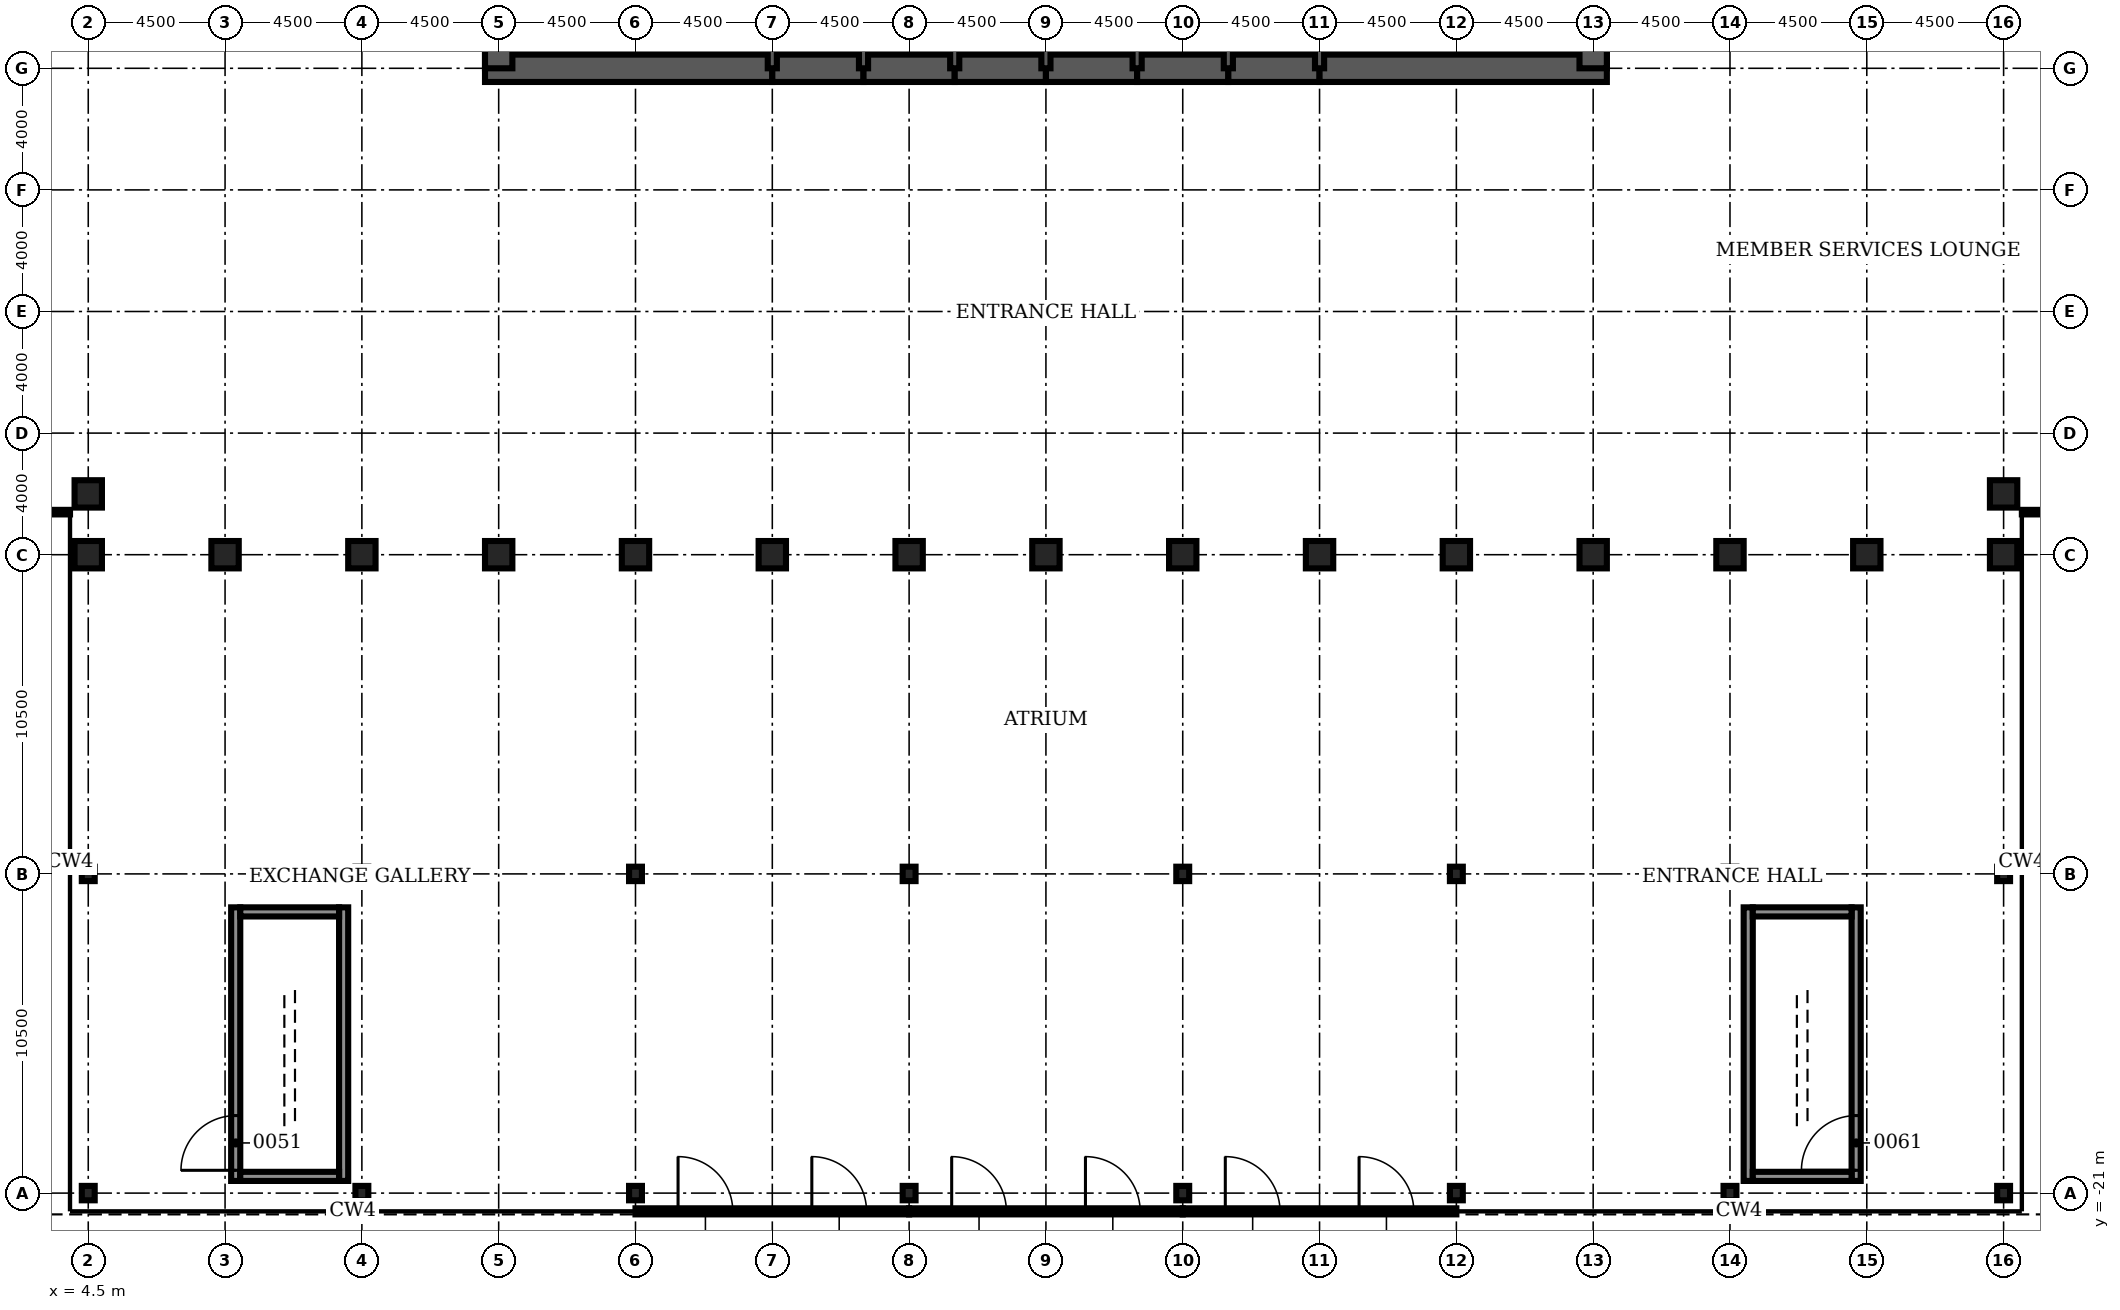
"""IFC4 building model, lengths in metres.
Left out: names, types, materials, properties, quantities, classifications, styles, units other than length and angle.
Written with IfcOpenShell. Run it as: python <this file> out.ifc"""

import sys

from ifc_helpers import new_model, si_unit, direction, frame, frame_2d, origin, origin_2d, place, context, subcontext, project, spatial, rectangle, hollow_rectangle, i_section, extrude, element, fill, save


model = new_model("IFC4")
c1 = context("Model", 3, precision=1e-05, world=origin(), true_north=direction((0.0, 1.0)))
c2 = subcontext(c1, "Body", "Model", "MODEL_VIEW")
j1 = project(units=[si_unit("LENGTHUNIT", "METRE"), si_unit("PLANEANGLEUNIT", "RADIAN")], contexts=[c1])
p1 = place(None, origin())
s1 = spatial("IfcSite", under=j1, at=p1, CompositionType="ELEMENT")
p2 = place(p1, origin())
s2 = spatial("IfcBuilding", under=s1, at=p2, CompositionType="ELEMENT")
p3 = place(p2, origin())
s3 = spatial("IfcBuildingStorey", under=s2, at=p3, CompositionType="ELEMENT", Elevation=0.0)
for number, where, z_axis, x_axis in (
    (1, (4.5, 0.0, 0.0), (0.0, 0.0, 1.0), (0.0, 1.0, 0.0)),
    (2, (9.0, 0.0, 0.0), (0.0, 0.0, 1.0), (0.0, 1.0, 0.0)),
    (3, (13.5, 0.0, 0.0), (0.0, 0.0, 1.0), (0.0, 1.0, 0.0)),
    (4, (18.0, 0.0, 0.0), (0.0, 0.0, 1.0), (0.0, 1.0, 0.0)),
    (5, (22.5, 0.0, 0.0), (0.0, 0.0, 1.0), (0.0, 1.0, 0.0)),
    (6, (27.0, 0.0, 0.0), (0.0, 0.0, 1.0), (0.0, 1.0, 0.0)),
    (7, (31.5, 0.0, 0.0), (0.0, 0.0, 1.0), (0.0, 1.0, 0.0)),
    (8, (36.0, 0.0, 0.0), (0.0, 0.0, 1.0), (0.0, 1.0, 0.0)),
    (9, (40.5, 0.0, 0.0), (0.0, 0.0, 1.0), (0.0, 1.0, 0.0)),
    (10, (45.0, 0.0, 0.0), (0.0, 0.0, 1.0), (0.0, 1.0, 0.0)),
    (11, (49.5, 0.0, 0.0), (0.0, 0.0, 1.0), (0.0, 1.0, 0.0)),
    (12, (54.0, 0.0, 0.0), (0.0, 0.0, 1.0), (0.0, 1.0, 0.0)),
    (13, (58.5, 0.0, 0.0), (0.0, 0.0, 1.0), (0.0, 1.0, 0.0)),
    (14, (63.0, 0.0, 0.0), (0.0, 0.0, 1.0), (0.0, 1.0, 0.0)),
    (15, (67.5, 0.0, 0.0), (0.0, 0.0, 1.0), (0.0, 1.0, 0.0)),
    (16, (67.5, 2.0, 0.0), (0.0, 0.0, 1.0), (0.0, 1.0, 0.0)),
    (17, (4.5, 2.0, 0.0), (0.0, 0.0, 1.0), (0.0, 1.0, 0.0)),
):
    element("IfcColumn", number, at=place(p3, frame(where, z_axis=z_axis, x_axis=x_axis)), inside=s3, PredefinedType="COLUMN", context=c2, shape_type="SweptSolid", body=[
        extrude(hollow_rectangle(XDim=0.9, YDim=0.9, WallThickness=0.12, at=origin_2d()), origin(), (0.0, 0.0, 1.0), 6.0),
    ])
for number, where, z_axis, x_axis in (
    (18, (4.5, -21.0, 0.0), (0.0, 0.0, 1.0), (1.0, 0.0, 0.0)),
    (19, (4.5, -10.5, 0.0), (0.0, 0.0, 1.0), (1.0, 0.0, 0.0)),
    (20, (13.5, -21.0, 0.0), (0.0, 0.0, 1.0), (1.0, 0.0, 0.0)),
    (21, (13.5, -10.5, 0.0), (0.0, 0.0, 1.0), (1.0, 0.0, 0.0)),
    (22, (22.5, -21.0, 0.0), (0.0, 0.0, 1.0), (1.0, 0.0, 0.0)),
    (23, (22.5, -10.5, 0.0), (0.0, 0.0, 1.0), (1.0, 0.0, 0.0)),
    (24, (31.5, -21.0, 0.0), (0.0, 0.0, 1.0), (1.0, 0.0, 0.0)),
    (25, (31.5, -10.5, 0.0), (0.0, 0.0, 1.0), (1.0, 0.0, 0.0)),
    (26, (40.5, -21.0, 0.0), (0.0, 0.0, 1.0), (1.0, 0.0, 0.0)),
    (27, (40.5, -10.5, 0.0), (0.0, 0.0, 1.0), (1.0, 0.0, 0.0)),
    (28, (49.5, -21.0, 0.0), (0.0, 0.0, 1.0), (1.0, 0.0, 0.0)),
    (29, (49.5, -10.5, 0.0), (0.0, 0.0, 1.0), (1.0, 0.0, 0.0)),
    (30, (58.5, -21.0, 0.0), (0.0, 0.0, 1.0), (1.0, 0.0, 0.0)),
    (31, (58.5, -10.5, 0.0), (0.0, 0.0, 1.0), (1.0, 0.0, 0.0)),
    (32, (67.5, -21.0, 0.0), (0.0, 0.0, 1.0), (1.0, 0.0, 0.0)),
    (33, (67.5, -10.5, 0.0), (0.0, 0.0, 1.0), (1.0, 0.0, 0.0)),
):
    element("IfcColumn", number, at=place(p3, frame(where, z_axis=z_axis, x_axis=x_axis)), inside=s3, PredefinedType="COLUMN", context=c2, shape_type="SweptSolid", body=[
        extrude(i_section(OverallWidth=0.424, OverallDepth=0.474, WebThickness=0.048, FlangeThickness=0.077, at=origin_2d()), origin(), (0.0, 0.0, 1.0), 6.0),
    ])
p4 = place(p3, frame((17.55, 16.0, 0.0), z_axis=(0.0, 0.0, 1.0), x_axis=(1.0, 0.0, 0.0)))
e34 = element("IfcWall", 34, at=p4, inside=s3, PredefinedType="SHEAR", context=c2, shape_type="SweptSolid", body=[
    extrude(rectangle(XDim=9.45, YDim=0.9, at=frame_2d((4.725, 0.0))), origin(), (0.0, 0.0, 1.0), 6.0),
])
for number, where, z_axis, x_axis in (
    (35, (27.0, 16.0, 0.0), (0.0, 0.0, 1.0), (1.0, 0.0, 0.0)),
    (36, (30.0, 16.0, 0.0), (0.0, 0.0, 1.0), (1.0, 0.0, 0.0)),
    (37, (33.0, 16.0, 0.0), (0.0, 0.0, 1.0), (1.0, 0.0, 0.0)),
    (38, (36.0, 16.0, 0.0), (0.0, 0.0, 1.0), (1.0, 0.0, 0.0)),
    (39, (39.0, 16.0, 0.0), (0.0, 0.0, 1.0), (1.0, 0.0, 0.0)),
    (40, (42.0, 16.0, 0.0), (0.0, 0.0, 1.0), (1.0, 0.0, 0.0)),
):
    element("IfcWall", number, at=place(p3, frame(where, z_axis=z_axis, x_axis=x_axis)), inside=s3, PredefinedType="SHEAR", context=c2, shape_type="SweptSolid", body=[
        extrude(rectangle(XDim=3.0, YDim=0.9, at=frame_2d((1.5, 0.0))), origin(), (0.0, 0.0, 1.0), 6.0),
    ])
p5 = place(p3, frame((45.0, 16.0, 0.0), z_axis=(0.0, 0.0, 1.0), x_axis=(1.0, 0.0, 0.0)))
e41 = element("IfcWall", 41, at=p5, inside=s3, PredefinedType="SHEAR", context=c2, shape_type="SweptSolid", body=[
    extrude(rectangle(XDim=9.45, YDim=0.9, at=frame_2d((4.725, 0.0))), origin(), (0.0, 0.0, 1.0), 6.0),
])
for number, where, z_axis, x_axis in (
    (42, (18.0, 19.2, 0.0), (0.0, 0.0, 1.0), (0.0, -1.0, 0.0)),
    (43, (54.0, 16.0, 0.0), (0.0, 0.0, 1.0), (0.0, 1.0, 0.0)),
):
    element("IfcWall", number, at=place(p3, frame(where, z_axis=z_axis, x_axis=x_axis)), inside=s3, PredefinedType="SHEAR", context=c2, shape_type="SweptSolid", body=[
        extrude(rectangle(XDim=3.2, YDim=0.9, at=frame_2d((1.6, 0.0))), origin(), (0.0, 0.0, 1.0), 6.0),
    ])
for number, where, z_axis, x_axis in (
    (44, (27.0, 16.0, 0.0), (0.0, 0.0, 1.0), (0.0, 1.0, 0.0)),
    (45, (30.0, 16.0, 0.0), (0.0, 0.0, 1.0), (0.0, 1.0, 0.0)),
    (46, (33.0, 16.0, 0.0), (0.0, 0.0, 1.0), (0.0, 1.0, 0.0)),
    (47, (36.0, 16.0, 0.0), (0.0, 0.0, 1.0), (0.0, 1.0, 0.0)),
    (48, (39.0, 16.0, 0.0), (0.0, 0.0, 1.0), (0.0, 1.0, 0.0)),
    (49, (42.0, 16.0, 0.0), (0.0, 0.0, 1.0), (0.0, 1.0, 0.0)),
    (50, (45.0, 16.0, 0.0), (0.0, 0.0, 1.0), (0.0, 1.0, 0.0)),
):
    element("IfcWall", number, at=place(p3, frame(where, z_axis=z_axis, x_axis=x_axis)), inside=s3, PredefinedType="SOLIDWALL", context=c2, shape_type="SweptSolid", body=[
        extrude(rectangle(XDim=3.2, YDim=0.3, at=frame_2d((1.6, 0.0))), origin(), (0.0, 0.0, 1.0), 6.0),
    ])
p6 = place(p3, frame((22.5, -21.6, 0.0), z_axis=(0.0, 0.0, 1.0), x_axis=(1.0, 0.0, 0.0)))
e51 = element("IfcWall", 51, at=p6, inside=s3, PredefinedType="USERDEFINED", context=c2, shape_type="SweptSolid", body=[
    extrude(rectangle(XDim=9.0, YDim=0.2, at=frame_2d((4.5, 0.0))), origin(), (0.0, 0.0, 1.0), 5.82),
])
p7 = place(p6, frame((1.4, 0.0, 0.0)))
e52 = element("IfcOpeningElement", 52, at=p7, cuts=e51, PredefinedType="OPENING", context=c2, shape_type="SweptSolid", body=[
    extrude(rectangle(XDim=1.8, YDim=2.4, at=frame_2d((0.9, 1.2))), frame((0.0, 0.11, 0.0), z_axis=(0.0, -1.0, 0.0), x_axis=(1.0, 0.0, 0.0)), (0.0, 0.0, 1.0), 0.22),
])
p8 = place(p6, frame((5.8, 0.0, 0.0)))
e53 = element("IfcOpeningElement", 53, at=p8, cuts=e51, PredefinedType="OPENING", context=c2, shape_type="SweptSolid", body=[
    extrude(rectangle(XDim=1.8, YDim=2.4, at=frame_2d((0.9, 1.2))), frame((0.0, 0.11, 0.0), z_axis=(0.0, -1.0, 0.0), x_axis=(1.0, 0.0, 0.0)), (0.0, 0.0, 1.0), 0.22),
])
p9 = place(p3, frame((31.5, -21.6, 0.0), z_axis=(0.0, 0.0, 1.0), x_axis=(1.0, 0.0, 0.0)))
e54 = element("IfcWall", 54, at=p9, inside=s3, PredefinedType="USERDEFINED", context=c2, shape_type="SweptSolid", body=[
    extrude(rectangle(XDim=9.0, YDim=0.2, at=frame_2d((4.5, 0.0))), origin(), (0.0, 0.0, 1.0), 5.82),
])
p10 = place(p9, frame((1.4, 0.0, 0.0)))
e55 = element("IfcOpeningElement", 55, at=p10, cuts=e54, PredefinedType="OPENING", context=c2, shape_type="SweptSolid", body=[
    extrude(rectangle(XDim=1.8, YDim=2.4, at=frame_2d((0.9, 1.2))), frame((0.0, 0.11, 0.0), z_axis=(0.0, -1.0, 0.0), x_axis=(1.0, 0.0, 0.0)), (0.0, 0.0, 1.0), 0.22),
])
p11 = place(p9, frame((5.8, 0.0, 0.0)))
e56 = element("IfcOpeningElement", 56, at=p11, cuts=e54, PredefinedType="OPENING", context=c2, shape_type="SweptSolid", body=[
    extrude(rectangle(XDim=1.8, YDim=2.4, at=frame_2d((0.9, 1.2))), frame((0.0, 0.11, 0.0), z_axis=(0.0, -1.0, 0.0), x_axis=(1.0, 0.0, 0.0)), (0.0, 0.0, 1.0), 0.22),
])
p12 = place(p3, frame((40.5, -21.6, 0.0), z_axis=(0.0, 0.0, 1.0), x_axis=(1.0, 0.0, 0.0)))
e57 = element("IfcWall", 57, at=p12, inside=s3, PredefinedType="USERDEFINED", context=c2, shape_type="SweptSolid", body=[
    extrude(rectangle(XDim=9.0, YDim=0.2, at=frame_2d((4.5, 0.0))), origin(), (0.0, 0.0, 1.0), 5.82),
])
p13 = place(p12, frame((1.4, 0.0, 0.0)))
e58 = element("IfcOpeningElement", 58, at=p13, cuts=e57, PredefinedType="OPENING", context=c2, shape_type="SweptSolid", body=[
    extrude(rectangle(XDim=1.8, YDim=2.4, at=frame_2d((0.9, 1.2))), frame((0.0, 0.11, 0.0), z_axis=(0.0, -1.0, 0.0), x_axis=(1.0, 0.0, 0.0)), (0.0, 0.0, 1.0), 0.22),
])
p14 = place(p12, frame((5.8, 0.0, 0.0)))
e59 = element("IfcOpeningElement", 59, at=p14, cuts=e57, PredefinedType="OPENING", context=c2, shape_type="SweptSolid", body=[
    extrude(rectangle(XDim=1.8, YDim=2.4, at=frame_2d((0.9, 1.2))), frame((0.0, 0.11, 0.0), z_axis=(0.0, -1.0, 0.0), x_axis=(1.0, 0.0, 0.0)), (0.0, 0.0, 1.0), 0.22),
])
for number, where, z_axis, x_axis in (
    (60, (68.1, 1.4, 0.0), (0.0, 0.0, 1.0), (1.0, 0.0, 0.0)),
    (61, (1.65, 1.4, 0.0), (0.0, 0.0, 1.0), (1.0, 0.0, 0.0)),
):
    element("IfcWall", number, at=place(p3, frame(where, z_axis=z_axis, x_axis=x_axis)), inside=s3, PredefinedType="ELEMENTEDWALL", context=c2, shape_type="SweptSolid", body=[
        extrude(rectangle(XDim=2.25, YDim=0.15, at=frame_2d((1.125, 0.0))), origin(), (0.0, 0.0, 1.0), 5.82),
    ])
p15 = place(p3, frame((9.35, -20.6, 0.0), z_axis=(0.0, 0.0, 1.0), x_axis=(0.0, 1.0, 0.0)))
e62 = element("IfcWall", 62, at=p15, inside=s3, PredefinedType="SOLIDWALL", context=c2, shape_type="SweptSolid", body=[
    extrude(rectangle(XDim=9.0, YDim=0.3, at=frame_2d((4.5, 0.0))), origin(), (0.0, 0.0, 1.0), 6.0),
])
p16 = place(p15, frame((0.35, 0.0, 0.0)))
e63 = element("IfcOpeningElement", 63, at=p16, cuts=e62, PredefinedType="OPENING", context=c2, shape_type="SweptSolid", body=[
    extrude(rectangle(XDim=1.8, YDim=2.1, at=frame_2d((0.9, 1.05))), frame((0.0, 0.16, 0.0), z_axis=(0.0, -1.0, 0.0), x_axis=(1.0, 0.0, 0.0)), (0.0, 0.0, 1.0), 0.32),
])
p17 = place(p3, frame((12.9, -20.6, 0.0), z_axis=(0.0, 0.0, 1.0), x_axis=(0.0, 1.0, 0.0)))
e64 = element("IfcWall", 64, at=p17, inside=s3, PredefinedType="SOLIDWALL", context=c2, shape_type="SweptSolid", body=[
    extrude(rectangle(XDim=9.0, YDim=0.3, at=frame_2d((4.5, 0.0))), origin(), (0.0, 0.0, 1.0), 6.0),
])
for number, where, z_axis, x_axis in (
    (65, (9.5, -20.45, 0.0), (0.0, 0.0, 1.0), (1.0, 0.0, 0.0)),
    (66, (9.5, -11.75, 0.0), (0.0, 0.0, 1.0), (1.0, 0.0, 0.0)),
):
    element("IfcWall", number, at=place(p3, frame(where, z_axis=z_axis, x_axis=x_axis)), inside=s3, PredefinedType="SOLIDWALL", context=c2, shape_type="SweptSolid", body=[
        extrude(rectangle(XDim=3.25, YDim=0.3, at=frame_2d((1.625, 0.0))), origin(), (0.0, 0.0, 1.0), 6.0),
    ])
p18 = place(p3, frame((59.1, -20.6, 0.0), z_axis=(0.0, 0.0, 1.0), x_axis=(0.0, 1.0, 0.0)))
e67 = element("IfcWall", 67, at=p18, inside=s3, PredefinedType="SOLIDWALL", context=c2, shape_type="SweptSolid", body=[
    extrude(rectangle(XDim=9.0, YDim=0.3, at=frame_2d((4.5, 0.0))), origin(), (0.0, 0.0, 1.0), 6.0),
])
p19 = place(p3, frame((62.65, -20.6, 0.0), z_axis=(0.0, 0.0, 1.0), x_axis=(0.0, 1.0, 0.0)))
e68 = element("IfcWall", 68, at=p19, inside=s3, PredefinedType="SOLIDWALL", context=c2, shape_type="SweptSolid", body=[
    extrude(rectangle(XDim=9.0, YDim=0.3, at=frame_2d((4.5, 0.0))), origin(), (0.0, 0.0, 1.0), 6.0),
])
p20 = place(p19, frame((0.35, 0.0, 0.0)))
e69 = element("IfcOpeningElement", 69, at=p20, cuts=e68, PredefinedType="OPENING", context=c2, shape_type="SweptSolid", body=[
    extrude(rectangle(XDim=1.8, YDim=2.1, at=frame_2d((0.9, 1.05))), frame((0.0, 0.16, 0.0), z_axis=(0.0, -1.0, 0.0), x_axis=(1.0, 0.0, 0.0)), (0.0, 0.0, 1.0), 0.32),
])
for number, where, z_axis, x_axis in (
    (70, (59.25, -20.45, 0.0), (0.0, 0.0, 1.0), (1.0, 0.0, 0.0)),
    (71, (59.25, -11.75, 0.0), (0.0, 0.0, 1.0), (1.0, 0.0, 0.0)),
):
    element("IfcWall", number, at=place(p3, frame(where, z_axis=z_axis, x_axis=x_axis)), inside=s3, PredefinedType="SOLIDWALL", context=c2, shape_type="SweptSolid", body=[
        extrude(rectangle(XDim=3.25, YDim=0.3, at=frame_2d((1.625, 0.0))), origin(), (0.0, 0.0, 1.0), 6.0),
    ])
p21 = place(p7, origin())
e72 = element("IfcDoor", 72, at=p21, inside=s3, OperationType="SINGLE_SWING_LEFT", PredefinedType="DOOR", context=c2, shape_type="SweptSolid", body=[
    extrude(rectangle(XDim=1.8, YDim=2.4, at=frame_2d((0.9, 1.2))), frame((0.0, 0.025, 0.0), z_axis=(0.0, -1.0, 0.0), x_axis=(1.0, 0.0, 0.0)), (0.0, 0.0, 1.0), 0.05),
])
fill(e52, e72)
p22 = place(p8, origin())
e73 = element("IfcDoor", 73, at=p22, inside=s3, OperationType="SINGLE_SWING_LEFT", PredefinedType="DOOR", context=c2, shape_type="SweptSolid", body=[
    extrude(rectangle(XDim=1.8, YDim=2.4, at=frame_2d((0.9, 1.2))), frame((0.0, 0.025, 0.0), z_axis=(0.0, -1.0, 0.0), x_axis=(1.0, 0.0, 0.0)), (0.0, 0.0, 1.0), 0.05),
])
fill(e53, e73)
p23 = place(p10, origin())
e74 = element("IfcDoor", 74, at=p23, inside=s3, OperationType="SINGLE_SWING_LEFT", PredefinedType="DOOR", context=c2, shape_type="SweptSolid", body=[
    extrude(rectangle(XDim=1.8, YDim=2.4, at=frame_2d((0.9, 1.2))), frame((0.0, 0.025, 0.0), z_axis=(0.0, -1.0, 0.0), x_axis=(1.0, 0.0, 0.0)), (0.0, 0.0, 1.0), 0.05),
])
fill(e55, e74)
p24 = place(p11, origin())
e75 = element("IfcDoor", 75, at=p24, inside=s3, OperationType="SINGLE_SWING_LEFT", PredefinedType="DOOR", context=c2, shape_type="SweptSolid", body=[
    extrude(rectangle(XDim=1.8, YDim=2.4, at=frame_2d((0.9, 1.2))), frame((0.0, 0.025, 0.0), z_axis=(0.0, -1.0, 0.0), x_axis=(1.0, 0.0, 0.0)), (0.0, 0.0, 1.0), 0.05),
])
fill(e56, e75)
p25 = place(p13, origin())
e76 = element("IfcDoor", 76, at=p25, inside=s3, OperationType="SINGLE_SWING_LEFT", PredefinedType="DOOR", context=c2, shape_type="SweptSolid", body=[
    extrude(rectangle(XDim=1.8, YDim=2.4, at=frame_2d((0.9, 1.2))), frame((0.0, 0.025, 0.0), z_axis=(0.0, -1.0, 0.0), x_axis=(1.0, 0.0, 0.0)), (0.0, 0.0, 1.0), 0.05),
])
fill(e58, e76)
p26 = place(p14, origin())
e77 = element("IfcDoor", 77, at=p26, inside=s3, OperationType="SINGLE_SWING_LEFT", PredefinedType="DOOR", context=c2, shape_type="SweptSolid", body=[
    extrude(rectangle(XDim=1.8, YDim=2.4, at=frame_2d((0.9, 1.2))), frame((0.0, 0.025, 0.0), z_axis=(0.0, -1.0, 0.0), x_axis=(1.0, 0.0, 0.0)), (0.0, 0.0, 1.0), 0.05),
])
fill(e59, e77)
p27 = place(p16, origin())
e78 = element("IfcDoor", 78, at=p27, inside=s3, OperationType="SINGLE_SWING_LEFT", PredefinedType="DOOR", context=c2, shape_type="SweptSolid", body=[
    extrude(rectangle(XDim=1.8, YDim=2.1, at=frame_2d((0.9, 1.05))), frame((0.0, 0.025, 0.0), z_axis=(0.0, -1.0, 0.0), x_axis=(1.0, 0.0, 0.0)), (0.0, 0.0, 1.0), 0.05),
])
fill(e63, e78)
p28 = place(p20, origin())
e79 = element("IfcDoor", 79, at=p28, inside=s3, OperationType="SINGLE_SWING_LEFT", PredefinedType="DOOR", context=c2, shape_type="SweptSolid", body=[
    extrude(rectangle(XDim=1.8, YDim=2.1, at=frame_2d((0.9, 1.05))), frame((0.0, 0.025, 0.0), z_axis=(0.0, -1.0, 0.0), x_axis=(1.0, 0.0, 0.0)), (0.0, 0.0, 1.0), 0.05),
])
fill(e69, e79)
save(model, sys.argv[1])
